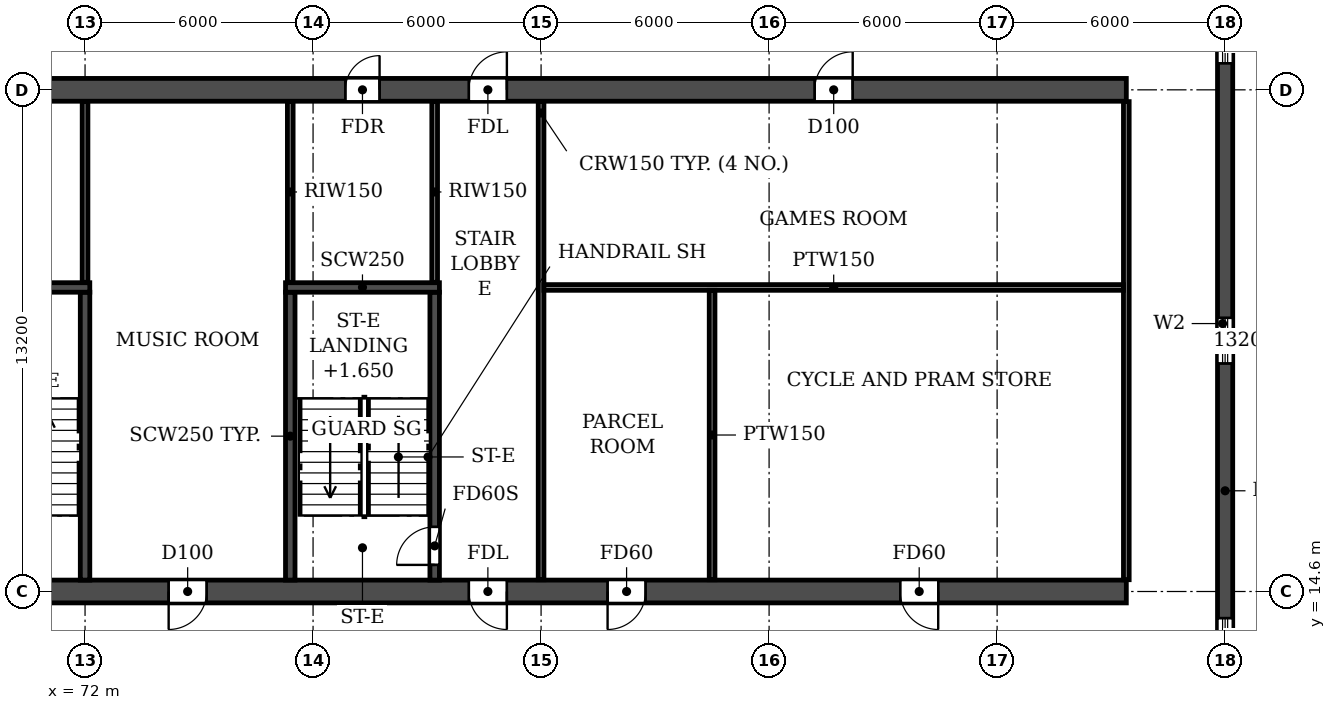
"""IFC4 building model, lengths in metres.
Left out: names, types, materials, properties, quantities, classifications, styles, units other than length and angle.
Written with IfcOpenShell. Run it as: python <this file> out.ifc"""

import sys

from ifc_helpers import new_model, si_unit, direction, frame, frame_2d, origin, place, context, subcontext, project, spatial, rectangle, extrude, element, fill, save


model = new_model("IFC4")
c1 = context("Model", 3, precision=1e-05, world=origin(), true_north=direction((0.0, 1.0)))
c2 = subcontext(c1, "Body", "Model", "MODEL_VIEW")
j1 = project(units=[si_unit("LENGTHUNIT", "METRE"), si_unit("PLANEANGLEUNIT", "RADIAN")], contexts=[c1])
p1 = place(None, origin())
s1 = spatial("IfcSite", under=j1, at=p1, CompositionType="ELEMENT")
p2 = place(p1, origin())
s2 = spatial("IfcBuilding", under=s1, at=p2, CompositionType="ELEMENT")
p3 = place(p2, frame((0.0, 0.0, 26.7)))
s3 = spatial("IfcBuildingStorey", under=s2, at=p3, CompositionType="ELEMENT", Elevation=26.7)
p4 = place(p3, frame((102.0, 4.683, 0.0), z_axis=(0.0, 0.0, 1.0), x_axis=(0.0, 1.0, 0.0)))
e1 = element("IfcWall", 1, at=p4, inside=s3, PredefinedType="SHEAR", context=c2, shape_type="SweptSolid", body=[
    extrude(rectangle(XDim=35.434, YDim=0.4, at=frame_2d((17.717, 0.0))), origin(), (0.0, 0.0, 1.0), 3.05),
])
p5 = place(p4, frame((15.917, 0.0, 0.9)))
e2 = element("IfcOpeningElement", 2, at=p5, cuts=e1, PredefinedType="OPENING", context=c2, shape_type="SweptSolid", body=[
    extrude(rectangle(XDim=1.2, YDim=1.5, at=frame_2d((0.6, 0.75))), frame((0.0, 0.21, 0.0), z_axis=(0.0, -1.0, 0.0), x_axis=(1.0, 0.0, 0.0)), (0.0, 0.0, 1.0), 0.42),
])
p6 = place(p4, frame((23.817, 0.0, 0.9)))
e3 = element("IfcOpeningElement", 3, at=p6, cuts=e1, PredefinedType="OPENING", context=c2, shape_type="SweptSolid", body=[
    extrude(rectangle(XDim=1.2, YDim=1.5, at=frame_2d((0.6, 0.75))), frame((0.0, 0.21, 0.0), z_axis=(0.0, -1.0, 0.0), x_axis=(1.0, 0.0, 0.0)), (0.0, 0.0, 1.0), 0.42),
])
p7 = place(p4, frame((8.017, 0.0, 0.9)))
e4 = element("IfcOpeningElement", 4, at=p7, cuts=e1, PredefinedType="OPENING", context=c2, shape_type="SweptSolid", body=[
    extrude(rectangle(XDim=1.2, YDim=1.5, at=frame_2d((0.6, 0.75))), frame((0.0, 0.21, 0.0), z_axis=(0.0, -1.0, 0.0), x_axis=(1.0, 0.0, 0.0)), (0.0, 0.0, 1.0), 0.42),
])
p8 = place(p4, frame((29.493, 0.0, 0.6)))
e5 = element("IfcOpeningElement", 5, at=p8, cuts=e1, PredefinedType="OPENING", context=c2, shape_type="SweptSolid", body=[
    extrude(rectangle(XDim=2.2, YDim=1.8, at=frame_2d((1.1, 0.9))), frame((0.0, 0.21, 0.0), z_axis=(0.0, -1.0, 0.0), x_axis=(1.0, 0.0, 0.0)), (0.0, 0.0, 1.0), 0.42),
])
p9 = place(p4, frame((2.541, 0.0, 0.6)))
e6 = element("IfcOpeningElement", 6, at=p9, cuts=e1, PredefinedType="OPENING", context=c2, shape_type="SweptSolid", body=[
    extrude(rectangle(XDim=2.2, YDim=1.8, at=frame_2d((1.1, 0.9))), frame((0.0, 0.21, 0.0), z_axis=(0.0, -1.0, 0.0), x_axis=(1.0, 0.0, 0.0)), (0.0, 0.0, 1.0), 0.42),
])
p10 = place(p3, frame((2.6, 14.6, 0.0), z_axis=(0.0, 0.0, 1.0), x_axis=(1.0, 0.0, 0.0)))
e7 = element("IfcWall", 7, at=p10, inside=s3, PredefinedType="SOLIDWALL", context=c2, shape_type="SweptSolid", body=[
    extrude(rectangle(XDim=96.8, YDim=0.6, at=frame_2d((48.4, 0.0))), origin(), (0.0, 0.0, 1.0), 3.05),
])
p11 = place(p10, frame((7.2, 0.0, 0.0)))
e8 = element("IfcOpeningElement", 8, at=p11, cuts=e7, PredefinedType="OPENING", context=c2, shape_type="SweptSolid", body=[
    extrude(rectangle(XDim=1.0, YDim=2.1, at=frame_2d((0.5, 1.05))), frame((0.0, 0.31, 0.0), z_axis=(0.0, -1.0, 0.0), x_axis=(1.0, 0.0, 0.0)), (0.0, 0.0, 1.0), 0.62),
])
p12 = place(p10, frame((16.3, 0.0, 0.0)))
e9 = element("IfcOpeningElement", 9, at=p12, cuts=e7, PredefinedType="OPENING", context=c2, shape_type="SweptSolid", body=[
    extrude(rectangle(XDim=1.0, YDim=2.1, at=frame_2d((0.5, 1.05))), frame((0.0, 0.31, 0.0), z_axis=(0.0, -1.0, 0.0), x_axis=(1.0, 0.0, 0.0)), (0.0, 0.0, 1.0), 0.62),
])
p13 = place(p10, frame((24.2, 0.0, 0.0)))
e10 = element("IfcOpeningElement", 10, at=p13, cuts=e7, PredefinedType="OPENING", context=c2, shape_type="SweptSolid", body=[
    extrude(rectangle(XDim=1.0, YDim=2.1, at=frame_2d((0.5, 1.05))), frame((0.0, 0.31, 0.0), z_axis=(0.0, -1.0, 0.0), x_axis=(1.0, 0.0, 0.0)), (0.0, 0.0, 1.0), 0.62),
])
p14 = place(p10, frame((28.8, 0.0, 0.0)))
e11 = element("IfcOpeningElement", 11, at=p14, cuts=e7, PredefinedType="OPENING", context=c2, shape_type="SweptSolid", body=[
    extrude(rectangle(XDim=1.0, YDim=2.1, at=frame_2d((0.5, 1.05))), frame((0.0, 0.31, 0.0), z_axis=(0.0, -1.0, 0.0), x_axis=(1.0, 0.0, 0.0)), (0.0, 0.0, 1.0), 0.62),
])
p15 = place(p10, frame((40.1, 0.0, 0.0)))
e12 = element("IfcOpeningElement", 12, at=p15, cuts=e7, PredefinedType="OPENING", context=c2, shape_type="SweptSolid", body=[
    extrude(rectangle(XDim=1.0, YDim=2.1, at=frame_2d((0.5, 1.05))), frame((0.0, 0.31, 0.0), z_axis=(0.0, -1.0, 0.0), x_axis=(1.0, 0.0, 0.0)), (0.0, 0.0, 1.0), 0.62),
])
p16 = place(p10, frame((44.0, 0.0, 0.0)))
e13 = element("IfcOpeningElement", 13, at=p16, cuts=e7, PredefinedType="OPENING", context=c2, shape_type="SweptSolid", body=[
    extrude(rectangle(XDim=1.0, YDim=2.1, at=frame_2d((0.5, 1.05))), frame((0.0, 0.31, 0.0), z_axis=(0.0, -1.0, 0.0), x_axis=(1.0, 0.0, 0.0)), (0.0, 0.0, 1.0), 0.62),
])
p17 = place(p10, frame((47.9, 0.0, 0.0)))
e14 = element("IfcOpeningElement", 14, at=p17, cuts=e7, PredefinedType="OPENING", context=c2, shape_type="SweptSolid", body=[
    extrude(rectangle(XDim=1.0, YDim=2.1, at=frame_2d((0.5, 1.05))), frame((0.0, 0.31, 0.0), z_axis=(0.0, -1.0, 0.0), x_axis=(1.0, 0.0, 0.0)), (0.0, 0.0, 1.0), 0.62),
])
p18 = place(p10, frame((53.1, 0.0, 0.0)))
e15 = element("IfcOpeningElement", 15, at=p18, cuts=e7, PredefinedType="OPENING", context=c2, shape_type="SweptSolid", body=[
    extrude(rectangle(XDim=1.0, YDim=2.1, at=frame_2d((0.5, 1.05))), frame((0.0, 0.31, 0.0), z_axis=(0.0, -1.0, 0.0), x_axis=(1.0, 0.0, 0.0)), (0.0, 0.0, 1.0), 0.62),
])
p19 = place(p10, frame((67.0, 0.0, 0.0)))
e16 = element("IfcOpeningElement", 16, at=p19, cuts=e7, PredefinedType="OPENING", context=c2, shape_type="SweptSolid", body=[
    extrude(rectangle(XDim=1.0, YDim=2.1, at=frame_2d((0.5, 1.05))), frame((0.0, 0.31, 0.0), z_axis=(0.0, -1.0, 0.0), x_axis=(1.0, 0.0, 0.0)), (0.0, 0.0, 1.0), 0.62),
])
p20 = place(p10, frame((71.6, 0.0, 0.0)))
e17 = element("IfcOpeningElement", 17, at=p20, cuts=e7, PredefinedType="OPENING", context=c2, shape_type="SweptSolid", body=[
    extrude(rectangle(XDim=1.0, YDim=2.1, at=frame_2d((0.5, 1.05))), frame((0.0, 0.31, 0.0), z_axis=(0.0, -1.0, 0.0), x_axis=(1.0, 0.0, 0.0)), (0.0, 0.0, 1.0), 0.62),
])
p21 = place(p10, frame((79.5, 0.0, 0.0)))
e18 = element("IfcOpeningElement", 18, at=p21, cuts=e7, PredefinedType="OPENING", context=c2, shape_type="SweptSolid", body=[
    extrude(rectangle(XDim=1.0, YDim=2.1, at=frame_2d((0.5, 1.05))), frame((0.0, 0.31, 0.0), z_axis=(0.0, -1.0, 0.0), x_axis=(1.0, 0.0, 0.0)), (0.0, 0.0, 1.0), 0.62),
])
p22 = place(p10, frame((83.15, 0.0, 0.0)))
e19 = element("IfcOpeningElement", 19, at=p22, cuts=e7, PredefinedType="OPENING", context=c2, shape_type="SweptSolid", body=[
    extrude(rectangle(XDim=1.0, YDim=2.1, at=frame_2d((0.5, 1.05))), frame((0.0, 0.31, 0.0), z_axis=(0.0, -1.0, 0.0), x_axis=(1.0, 0.0, 0.0)), (0.0, 0.0, 1.0), 0.62),
])
p23 = place(p10, frame((90.85, 0.0, 0.0)))
e20 = element("IfcOpeningElement", 20, at=p23, cuts=e7, PredefinedType="OPENING", context=c2, shape_type="SweptSolid", body=[
    extrude(rectangle(XDim=1.0, YDim=2.1, at=frame_2d((0.5, 1.05))), frame((0.0, 0.31, 0.0), z_axis=(0.0, -1.0, 0.0), x_axis=(1.0, 0.0, 0.0)), (0.0, 0.0, 1.0), 0.62),
])
p24 = place(p3, frame((2.6, 27.8, 0.0), z_axis=(0.0, 0.0, 1.0), x_axis=(1.0, 0.0, 0.0)))
e21 = element("IfcWall", 21, at=p24, inside=s3, PredefinedType="SOLIDWALL", context=c2, shape_type="SweptSolid", body=[
    extrude(rectangle(XDim=96.8, YDim=0.6, at=frame_2d((48.4, 0.0))), origin(), (0.0, 0.0, 1.0), 3.05),
])
p25 = place(p24, frame((1.8, 0.0, 0.0)))
e22 = element("IfcOpeningElement", 22, at=p25, cuts=e21, PredefinedType="OPENING", context=c2, shape_type="SweptSolid", body=[
    extrude(rectangle(XDim=1.0, YDim=2.1, at=frame_2d((0.5, 1.05))), frame((0.0, 0.31, 0.0), z_axis=(0.0, -1.0, 0.0), x_axis=(1.0, 0.0, 0.0)), (0.0, 0.0, 1.0), 0.62),
])
p26 = place(p24, frame((9.5, 0.0, 0.0)))
e23 = element("IfcOpeningElement", 23, at=p26, cuts=e21, PredefinedType="OPENING", context=c2, shape_type="SweptSolid", body=[
    extrude(rectangle(XDim=1.0, YDim=2.1, at=frame_2d((0.5, 1.05))), frame((0.0, 0.31, 0.0), z_axis=(0.0, -1.0, 0.0), x_axis=(1.0, 0.0, 0.0)), (0.0, 0.0, 1.0), 0.62),
])
p27 = place(p24, frame((16.3, 0.0, 0.0)))
e24 = element("IfcOpeningElement", 24, at=p27, cuts=e21, PredefinedType="OPENING", context=c2, shape_type="SweptSolid", body=[
    extrude(rectangle(XDim=1.0, YDim=2.1, at=frame_2d((0.5, 1.05))), frame((0.0, 0.31, 0.0), z_axis=(0.0, -1.0, 0.0), x_axis=(1.0, 0.0, 0.0)), (0.0, 0.0, 1.0), 0.62),
])
p28 = place(p24, frame((19.65, 0.0, 0.0)))
e25 = element("IfcOpeningElement", 25, at=p28, cuts=e21, PredefinedType="OPENING", context=c2, shape_type="SweptSolid", body=[
    extrude(rectangle(XDim=0.9, YDim=2.1, at=frame_2d((0.45, 1.05))), frame((0.0, 0.31, 0.0), z_axis=(0.0, -1.0, 0.0), x_axis=(1.0, 0.0, 0.0)), (0.0, 0.0, 1.0), 0.62),
])
p29 = place(p24, frame((28.85, 0.0, 0.0)))
e26 = element("IfcOpeningElement", 26, at=p29, cuts=e21, PredefinedType="OPENING", context=c2, shape_type="SweptSolid", body=[
    extrude(rectangle(XDim=0.9, YDim=2.1, at=frame_2d((0.45, 1.05))), frame((0.0, 0.31, 0.0), z_axis=(0.0, -1.0, 0.0), x_axis=(1.0, 0.0, 0.0)), (0.0, 0.0, 1.0), 0.62),
])
p30 = place(p24, frame((32.0, 0.0, 0.0)))
e27 = element("IfcOpeningElement", 27, at=p30, cuts=e21, PredefinedType="OPENING", context=c2, shape_type="SweptSolid", body=[
    extrude(rectangle(XDim=1.0, YDim=2.1, at=frame_2d((0.5, 1.05))), frame((0.0, 0.31, 0.0), z_axis=(0.0, -1.0, 0.0), x_axis=(1.0, 0.0, 0.0)), (0.0, 0.0, 1.0), 0.62),
])
p31 = place(p24, frame((37.2, 0.0, 0.0)))
e28 = element("IfcOpeningElement", 28, at=p31, cuts=e21, PredefinedType="OPENING", context=c2, shape_type="SweptSolid", body=[
    extrude(rectangle(XDim=1.0, YDim=2.1, at=frame_2d((0.5, 1.05))), frame((0.0, 0.31, 0.0), z_axis=(0.0, -1.0, 0.0), x_axis=(1.0, 0.0, 0.0)), (0.0, 0.0, 1.0), 0.62),
])
p32 = place(p24, frame((45.0, 0.0, 0.0)))
e29 = element("IfcOpeningElement", 29, at=p32, cuts=e21, PredefinedType="OPENING", context=c2, shape_type="SweptSolid", body=[
    extrude(rectangle(XDim=1.0, YDim=2.1, at=frame_2d((0.5, 1.05))), frame((0.0, 0.31, 0.0), z_axis=(0.0, -1.0, 0.0), x_axis=(1.0, 0.0, 0.0)), (0.0, 0.0, 1.0), 0.62),
])
p33 = place(p24, frame((47.9, 0.0, 0.0)))
e30 = element("IfcOpeningElement", 30, at=p33, cuts=e21, PredefinedType="OPENING", context=c2, shape_type="SweptSolid", body=[
    extrude(rectangle(XDim=1.0, YDim=2.1, at=frame_2d((0.5, 1.05))), frame((0.0, 0.31, 0.0), z_axis=(0.0, -1.0, 0.0), x_axis=(1.0, 0.0, 0.0)), (0.0, 0.0, 1.0), 0.62),
])
p34 = place(p24, frame((52.1, 0.0, 0.0)))
e31 = element("IfcOpeningElement", 31, at=p34, cuts=e21, PredefinedType="OPENING", context=c2, shape_type="SweptSolid", body=[
    extrude(rectangle(XDim=1.0, YDim=2.1, at=frame_2d((0.5, 1.05))), frame((0.0, 0.31, 0.0), z_axis=(0.0, -1.0, 0.0), x_axis=(1.0, 0.0, 0.0)), (0.0, 0.0, 1.0), 0.62),
])
p35 = place(p24, frame((56.0, 0.0, 0.0)))
e32 = element("IfcOpeningElement", 32, at=p35, cuts=e21, PredefinedType="OPENING", context=c2, shape_type="SweptSolid", body=[
    extrude(rectangle(XDim=1.0, YDim=2.1, at=frame_2d((0.5, 1.05))), frame((0.0, 0.31, 0.0), z_axis=(0.0, -1.0, 0.0), x_axis=(1.0, 0.0, 0.0)), (0.0, 0.0, 1.0), 0.62),
])
p36 = place(p24, frame((58.6, 0.0, 0.0)))
e33 = element("IfcOpeningElement", 33, at=p36, cuts=e21, PredefinedType="OPENING", context=c2, shape_type="SweptSolid", body=[
    extrude(rectangle(XDim=1.0, YDim=2.1, at=frame_2d((0.5, 1.05))), frame((0.0, 0.31, 0.0), z_axis=(0.0, -1.0, 0.0), x_axis=(1.0, 0.0, 0.0)), (0.0, 0.0, 1.0), 0.62),
])
p37 = place(p24, frame((62.25, 0.0, 0.0)))
e34 = element("IfcOpeningElement", 34, at=p37, cuts=e21, PredefinedType="OPENING", context=c2, shape_type="SweptSolid", body=[
    extrude(rectangle(XDim=1.5, YDim=2.1, at=frame_2d((0.75, 1.05))), frame((0.0, 0.31, 0.0), z_axis=(0.0, -1.0, 0.0), x_axis=(1.0, 0.0, 0.0)), (0.0, 0.0, 1.0), 0.62),
])
p38 = place(p24, frame((67.05, 0.0, 0.0)))
e35 = element("IfcOpeningElement", 35, at=p38, cuts=e21, PredefinedType="OPENING", context=c2, shape_type="SweptSolid", body=[
    extrude(rectangle(XDim=0.9, YDim=2.1, at=frame_2d((0.45, 1.05))), frame((0.0, 0.31, 0.0), z_axis=(0.0, -1.0, 0.0), x_axis=(1.0, 0.0, 0.0)), (0.0, 0.0, 1.0), 0.62),
])
p39 = place(p24, frame((76.25, 0.0, 0.0)))
e36 = element("IfcOpeningElement", 36, at=p39, cuts=e21, PredefinedType="OPENING", context=c2, shape_type="SweptSolid", body=[
    extrude(rectangle(XDim=0.9, YDim=2.1, at=frame_2d((0.45, 1.05))), frame((0.0, 0.31, 0.0), z_axis=(0.0, -1.0, 0.0), x_axis=(1.0, 0.0, 0.0)), (0.0, 0.0, 1.0), 0.62),
])
p40 = place(p24, frame((79.5, 0.0, 0.0)))
e37 = element("IfcOpeningElement", 37, at=p40, cuts=e21, PredefinedType="OPENING", context=c2, shape_type="SweptSolid", body=[
    extrude(rectangle(XDim=1.0, YDim=2.1, at=frame_2d((0.5, 1.05))), frame((0.0, 0.31, 0.0), z_axis=(0.0, -1.0, 0.0), x_axis=(1.0, 0.0, 0.0)), (0.0, 0.0, 1.0), 0.62),
])
p41 = place(p24, frame((88.6, 0.0, 0.0)))
e38 = element("IfcOpeningElement", 38, at=p41, cuts=e21, PredefinedType="OPENING", context=c2, shape_type="SweptSolid", body=[
    extrude(rectangle(XDim=1.0, YDim=2.1, at=frame_2d((0.5, 1.05))), frame((0.0, 0.31, 0.0), z_axis=(0.0, -1.0, 0.0), x_axis=(1.0, 0.0, 0.0)), (0.0, 0.0, 1.0), 0.62),
])
p42 = place(p3, frame((72.0, 14.9, 0.0), z_axis=(0.0, 0.0, 1.0), x_axis=(0.0, 1.0, 0.0)))
e39 = element("IfcWall", 39, at=p42, inside=s3, PredefinedType="SOLIDWALL", context=c2, shape_type="SweptSolid", body=[
    extrude(rectangle(XDim=7.575, YDim=0.25, at=frame_2d((3.788, 0.0))), origin(), (0.0, 0.0, 1.0), 3.05),
])
p43 = place(p3, frame((68.075, 22.6, 0.0), z_axis=(0.0, 0.0, 1.0), x_axis=(1.0, 0.0, 0.0)))
e40 = element("IfcWall", 40, at=p43, inside=s3, PredefinedType="SOLIDWALL", context=c2, shape_type="SweptSolid", body=[
    extrude(rectangle(XDim=4.05, YDim=0.25, at=frame_2d((2.025, 0.0))), origin(), (0.0, 0.0, 1.0), 3.05),
])
p44 = place(p3, frame((77.4, 14.9, 0.0), z_axis=(0.0, 0.0, 1.0), x_axis=(0.0, 1.0, 0.0)))
e41 = element("IfcWall", 41, at=p44, inside=s3, PredefinedType="SOLIDWALL", context=c2, shape_type="SweptSolid", body=[
    extrude(rectangle(XDim=7.575, YDim=0.25, at=frame_2d((3.788, 0.0))), origin(), (0.0, 0.0, 1.0), 3.05),
])
p45 = place(p3, frame((81.2, 14.9, 0.0), z_axis=(0.0, 0.0, 1.0), x_axis=(0.0, 1.0, 0.0)))
e42 = element("IfcWall", 42, at=p45, inside=s3, PredefinedType="SOLIDWALL", context=c2, shape_type="SweptSolid", body=[
    extrude(rectangle(XDim=7.575, YDim=0.25, at=frame_2d((3.788, 0.0))), origin(), (0.0, 0.0, 1.0), 3.05),
])
p46 = place(p45, frame((0.4, 0.0, 0.0)))
e43 = element("IfcOpeningElement", 43, at=p46, cuts=e42, PredefinedType="OPENING", context=c2, shape_type="SweptSolid", body=[
    extrude(rectangle(XDim=1.0, YDim=2.1, at=frame_2d((0.5, 1.05))), frame((0.0, 0.135, 0.0), z_axis=(0.0, -1.0, 0.0), x_axis=(1.0, 0.0, 0.0)), (0.0, 0.0, 1.0), 0.27),
])
p47 = place(p3, frame((77.275, 22.6, 0.0), z_axis=(0.0, 0.0, 1.0), x_axis=(1.0, 0.0, 0.0)))
e44 = element("IfcWall", 44, at=p47, inside=s3, PredefinedType="SOLIDWALL", context=c2, shape_type="SweptSolid", body=[
    extrude(rectangle(XDim=4.05, YDim=0.25, at=frame_2d((2.025, 0.0))), origin(), (0.0, 0.0, 1.0), 3.05),
])
for number, where, z_axis, x_axis in (
    (45, (84.0, 14.91, 0.0), (0.0, 0.0, 1.0), (0.0, 1.0, 0.0)),
    (46, (99.4, 14.91, 0.0), (0.0, 0.0, 1.0), (0.0, 1.0, 0.0)),
):
    element("IfcWall", number, at=place(p3, frame(where, z_axis=z_axis, x_axis=x_axis)), inside=s3, PredefinedType="PARTITIONING", context=c2, shape_type="SweptSolid", body=[
        extrude(rectangle(XDim=12.58, YDim=0.15, at=frame_2d((6.29, 0.0))), origin(), (0.0, 0.0, 1.0), 3.05),
    ])
p48 = place(p3, frame((84.075, 22.6, 0.0), z_axis=(0.0, 0.0, 1.0), x_axis=(1.0, 0.0, 0.0)))
e47 = element("IfcWall", 47, at=p48, inside=s3, PredefinedType="PARTITIONING", context=c2, shape_type="SweptSolid", body=[
    extrude(rectangle(XDim=15.25, YDim=0.15, at=frame_2d((7.625, 0.0))), origin(), (0.0, 0.0, 1.0), 3.05),
])
p49 = place(p3, frame((88.5, 14.91, 0.0), z_axis=(0.0, 0.0, 1.0), x_axis=(0.0, 1.0, 0.0)))
e48 = element("IfcWall", 48, at=p49, inside=s3, PredefinedType="PARTITIONING", context=c2, shape_type="SweptSolid", body=[
    extrude(rectangle(XDim=7.615, YDim=0.15, at=frame_2d((3.808, 0.0))), origin(), (0.0, 0.0, 1.0), 3.05),
])
for number, where, z_axis, x_axis in (
    (49, (72.0, 22.735, 0.0), (0.0, 0.0, 1.0), (0.0, 1.0, 0.0)),
    (50, (77.4, 22.735, 0.0), (0.0, 0.0, 1.0), (0.0, 1.0, 0.0)),
    (51, (81.2, 22.735, 0.0), (0.0, 0.0, 1.0), (0.0, 1.0, 0.0)),
):
    element("IfcWall", number, at=place(p3, frame(where, z_axis=z_axis, x_axis=x_axis)), inside=s3, PredefinedType="PARTITIONING", context=c2, shape_type="SweptSolid", body=[
        extrude(rectangle(XDim=4.755, YDim=0.15, at=frame_2d((2.377, 0.0))), origin(), (0.0, 0.0, 1.0), 3.05),
    ])
p50 = place(p5, origin())
e52 = element("IfcWindow", 52, at=p50, inside=s3, PartitioningType="SINGLE_PANEL", PredefinedType="WINDOW", context=c2, shape_type="SweptSolid", body=[
    extrude(rectangle(XDim=1.2, YDim=1.5, at=frame_2d((0.6, 0.75))), frame((0.0, 0.03, 0.0), z_axis=(0.0, -1.0, 0.0), x_axis=(1.0, 0.0, 0.0)), (0.0, 0.0, 1.0), 0.06),
])
fill(e2, e52)
p51 = place(p6, origin())
e53 = element("IfcWindow", 53, at=p51, inside=s3, PartitioningType="SINGLE_PANEL", PredefinedType="WINDOW", context=c2, shape_type="SweptSolid", body=[
    extrude(rectangle(XDim=1.2, YDim=1.5, at=frame_2d((0.6, 0.75))), frame((0.0, 0.03, 0.0), z_axis=(0.0, -1.0, 0.0), x_axis=(1.0, 0.0, 0.0)), (0.0, 0.0, 1.0), 0.06),
])
fill(e3, e53)
p52 = place(p7, origin())
e54 = element("IfcWindow", 54, at=p52, inside=s3, PartitioningType="SINGLE_PANEL", PredefinedType="WINDOW", context=c2, shape_type="SweptSolid", body=[
    extrude(rectangle(XDim=1.2, YDim=1.5, at=frame_2d((0.6, 0.75))), frame((0.0, 0.03, 0.0), z_axis=(0.0, -1.0, 0.0), x_axis=(1.0, 0.0, 0.0)), (0.0, 0.0, 1.0), 0.06),
])
fill(e4, e54)
p53 = place(p39, origin())
e55 = element("IfcDoor", 55, at=p53, inside=s3, OperationType="SINGLE_SWING_RIGHT", PredefinedType="DOOR", context=c2, shape_type="SweptSolid", body=[
    extrude(rectangle(XDim=0.9, YDim=2.1, at=frame_2d((0.45, 1.05))), frame((0.0, 0.025, 0.0), z_axis=(0.0, -1.0, 0.0), x_axis=(1.0, 0.0, 0.0)), (0.0, 0.0, 1.0), 0.05),
])
fill(e36, e55)
p54 = place(p40, origin())
e56 = element("IfcDoor", 56, at=p54, inside=s3, OperationType="SINGLE_SWING_RIGHT", PredefinedType="DOOR", context=c2, shape_type="SweptSolid", body=[
    extrude(rectangle(XDim=1.0, YDim=2.1, at=frame_2d((0.5, 1.05))), frame((0.0, 0.025, 0.0), z_axis=(0.0, -1.0, 0.0), x_axis=(1.0, 0.0, 0.0)), (0.0, 0.0, 1.0), 0.05),
])
fill(e37, e56)
p55 = place(p41, origin())
e57 = element("IfcDoor", 57, at=p55, inside=s3, OperationType="SINGLE_SWING_RIGHT", PredefinedType="DOOR", context=c2, shape_type="SweptSolid", body=[
    extrude(rectangle(XDim=1.0, YDim=2.1, at=frame_2d((0.5, 1.05))), frame((0.0, 0.025, 0.0), z_axis=(0.0, -1.0, 0.0), x_axis=(1.0, 0.0, 0.0)), (0.0, 0.0, 1.0), 0.05),
])
fill(e38, e57)
p56 = place(p20, frame((1.0, 0.0, 0.0), z_axis=(0.0, 0.0, 1.0), x_axis=(-1.0, 0.0, 0.0)))
e58 = element("IfcDoor", 58, at=p56, inside=s3, OperationType="SINGLE_SWING_RIGHT", PredefinedType="DOOR", context=c2, shape_type="SweptSolid", body=[
    extrude(rectangle(XDim=1.0, YDim=2.1, at=frame_2d((0.5, 1.05))), frame((0.0, 0.025, 0.0), z_axis=(0.0, -1.0, 0.0), x_axis=(1.0, 0.0, 0.0)), (0.0, 0.0, 1.0), 0.05),
])
fill(e17, e58)
p57 = place(p21, frame((1.0, 0.0, 0.0), z_axis=(0.0, 0.0, 1.0), x_axis=(-1.0, 0.0, 0.0)))
e59 = element("IfcDoor", 59, at=p57, inside=s3, OperationType="SINGLE_SWING_LEFT", PredefinedType="DOOR", context=c2, shape_type="SweptSolid", body=[
    extrude(rectangle(XDim=1.0, YDim=2.1, at=frame_2d((0.5, 1.05))), frame((0.0, 0.025, 0.0), z_axis=(0.0, -1.0, 0.0), x_axis=(1.0, 0.0, 0.0)), (0.0, 0.0, 1.0), 0.05),
])
fill(e18, e59)
p58 = place(p22, frame((1.0, 0.0, 0.0), z_axis=(0.0, 0.0, 1.0), x_axis=(-1.0, 0.0, 0.0)))
e60 = element("IfcDoor", 60, at=p58, inside=s3, OperationType="SINGLE_SWING_RIGHT", PredefinedType="DOOR", context=c2, shape_type="SweptSolid", body=[
    extrude(rectangle(XDim=1.0, YDim=2.1, at=frame_2d((0.5, 1.05))), frame((0.0, 0.025, 0.0), z_axis=(0.0, -1.0, 0.0), x_axis=(1.0, 0.0, 0.0)), (0.0, 0.0, 1.0), 0.05),
])
fill(e19, e60)
p59 = place(p23, frame((1.0, 0.0, 0.0), z_axis=(0.0, 0.0, 1.0), x_axis=(-1.0, 0.0, 0.0)))
e61 = element("IfcDoor", 61, at=p59, inside=s3, OperationType="SINGLE_SWING_LEFT", PredefinedType="DOOR", context=c2, shape_type="SweptSolid", body=[
    extrude(rectangle(XDim=1.0, YDim=2.1, at=frame_2d((0.5, 1.05))), frame((0.0, 0.025, 0.0), z_axis=(0.0, -1.0, 0.0), x_axis=(1.0, 0.0, 0.0)), (0.0, 0.0, 1.0), 0.05),
])
fill(e20, e61)
p60 = place(p46, origin())
e62 = element("IfcDoor", 62, at=p60, inside=s3, OperationType="SINGLE_SWING_LEFT", PredefinedType="DOOR", context=c2, shape_type="SweptSolid", body=[
    extrude(rectangle(XDim=1.0, YDim=2.1, at=frame_2d((0.5, 1.05))), frame((0.0, 0.025, 0.0), z_axis=(0.0, -1.0, 0.0), x_axis=(1.0, 0.0, 0.0)), (0.0, 0.0, 1.0), 0.05),
])
fill(e43, e62)
save(model, sys.argv[1])
